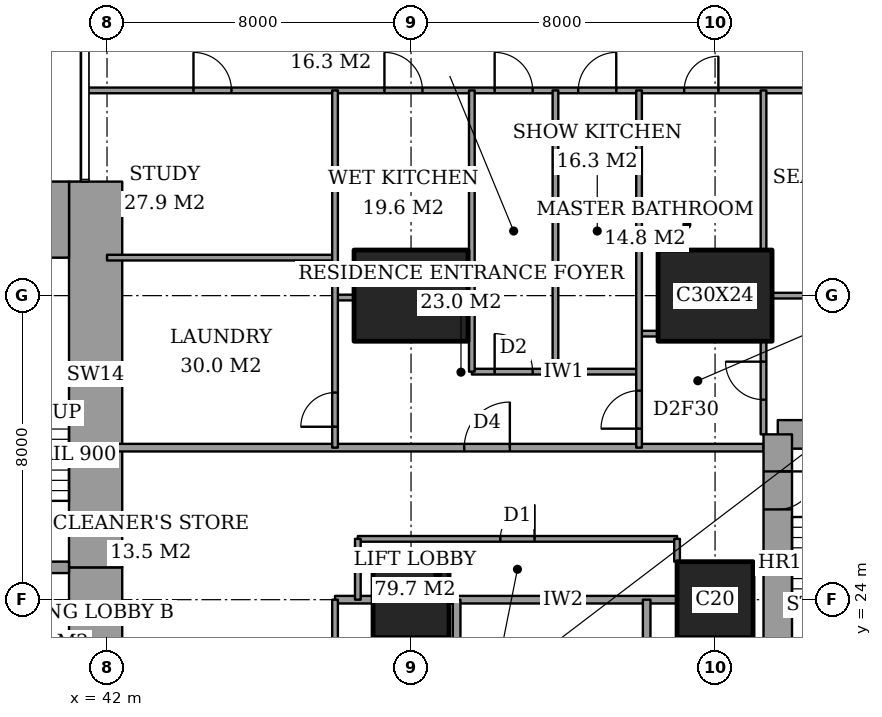
"""IFC4 building model, lengths in metres.
Left out: names, types, materials, properties, quantities, classifications, styles, units other than length and angle.
Written with IfcOpenShell. Run it as: python <this file> out.ifc"""

import sys

from ifc_helpers import new_model, si_unit, direction, frame, frame_2d, origin, origin_2d, place, context, subcontext, project, spatial, rectangle, extrude, element, fill, save


model = new_model("IFC4")
c1 = context("Model", 3, precision=1e-05, world=origin(), true_north=direction((0.0, 1.0)))
c2 = subcontext(c1, "Body", "Model", "MODEL_VIEW")
j1 = project(units=[si_unit("LENGTHUNIT", "METRE"), si_unit("PLANEANGLEUNIT", "RADIAN")], contexts=[c1])
p1 = place(None, origin())
s1 = spatial("IfcSite", under=j1, at=p1, CompositionType="ELEMENT")
p2 = place(p1, origin())
s2 = spatial("IfcBuilding", under=s1, at=p2, CompositionType="ELEMENT")
p3 = place(p2, frame((0.0, 0.0, 36.8)))
s3 = spatial("IfcBuildingStorey", under=s2, at=p3, CompositionType="ELEMENT", Elevation=36.8)
p4 = place(p3, frame((50.0, 24.0, 0.0), z_axis=(0.0, 0.0, 1.0), x_axis=(1.0, 0.0, 0.0)))
e1 = element("IfcColumn", 1, at=p4, inside=s3, PredefinedType="COLUMN", context=c2, shape_type="SweptSolid", body=[
    extrude(rectangle(XDim=2.0, YDim=2.0, at=origin_2d()), origin(), (0.0, 0.0, 1.0), 3.6),
])
p5 = place(p3, frame((50.0, 32.0, 0.0), z_axis=(0.0, 0.0, 1.0), x_axis=(1.0, 0.0, 0.0)))
e2 = element("IfcColumn", 2, at=p5, inside=s3, PredefinedType="COLUMN", context=c2, shape_type="SweptSolid", body=[
    extrude(rectangle(XDim=3.0, YDim=2.4, at=origin_2d()), origin(), (0.0, 0.0, 1.0), 3.6),
])
p6 = place(p3, frame((58.0, 24.0, 0.0), z_axis=(0.0, 0.0, 1.0), x_axis=(1.0, 0.0, 0.0)))
e3 = element("IfcColumn", 3, at=p6, inside=s3, PredefinedType="COLUMN", context=c2, shape_type="SweptSolid", body=[
    extrude(rectangle(XDim=2.0, YDim=2.0, at=origin_2d()), origin(), (0.0, 0.0, 1.0), 3.6),
])
p7 = place(p3, frame((58.0, 32.0, 0.0), z_axis=(0.0, 0.0, 1.0), x_axis=(1.0, 0.0, 0.0)))
e4 = element("IfcColumn", 4, at=p7, inside=s3, PredefinedType="COLUMN", context=c2, shape_type="SweptSolid", body=[
    extrude(rectangle(XDim=3.0, YDim=2.4, at=origin_2d()), origin(), (0.0, 0.0, 1.0), 3.6),
])
p8 = place(p3, frame((37.85, 34.0, 0.0), z_axis=(0.0, 0.0, 1.0), x_axis=(1.0, 0.0, 0.0)))
e5 = element("IfcWall", 5, at=p8, inside=s3, PredefinedType="SHEAR", context=c2, shape_type="SweptSolid", body=[
    extrude(rectangle(XDim=3.15, YDim=2.0, at=frame_2d((1.575, 0.0))), origin(), (0.0, 0.0, 1.0), 3.6),
])
p9 = place(p3, frame((41.7, 13.0, 0.0), z_axis=(0.0, 0.0, 1.0), x_axis=(0.0, 1.0, 0.0)))
e6 = element("IfcWall", 6, at=p9, inside=s3, PredefinedType="SHEAR", context=c2, shape_type="SweptSolid", body=[
    extrude(rectangle(XDim=11.85, YDim=1.4, at=frame_2d((5.925, 0.0))), origin(), (0.0, 0.0, 1.0), 3.6),
])
p10 = place(p9, frame((7.5, 0.0, 0.0)))
e7 = element("IfcOpeningElement", 7, at=p10, cuts=e6, PredefinedType="OPENING", context=c2, shape_type="SweptSolid", body=[
    extrude(rectangle(XDim=1.8, YDim=2.4, at=frame_2d((0.9, 1.2))), frame((0.0, 0.71, 0.0), z_axis=(0.0, -1.0, 0.0), x_axis=(1.0, 0.0, 0.0)), (0.0, 0.0, 1.0), 1.42),
])
p11 = place(p3, frame((41.7, 24.85, 0.0), z_axis=(0.0, 0.0, 1.0), x_axis=(0.0, 1.0, 0.0)))
e8 = element("IfcWall", 8, at=p11, inside=s3, PredefinedType="SHEAR", context=c2, shape_type="SweptSolid", body=[
    extrude(rectangle(XDim=10.15, YDim=1.4, at=frame_2d((5.075, 0.0))), origin(), (0.0, 0.0, 1.0), 3.6),
])
p12 = place(p3, frame((37.85, 24.85, 0.0), z_axis=(0.0, 0.0, 1.0), x_axis=(1.0, 0.0, 0.0)))
e9 = element("IfcWall", 9, at=p12, inside=s3, PredefinedType="SHEAR", context=c2, shape_type="SweptSolid", body=[
    extrude(rectangle(XDim=3.15, YDim=0.3, at=frame_2d((1.575, 0.0))), origin(), (0.0, 0.0, 1.0), 3.6),
])
p13 = place(p12, frame((0.95, 0.0, 0.0)))
e10 = element("IfcOpeningElement", 10, at=p13, cuts=e9, PredefinedType="OPENING", context=c2, shape_type="SweptSolid", body=[
    extrude(rectangle(XDim=1.0, YDim=2.1, at=frame_2d((0.5, 1.05))), frame((0.0, 0.16, 0.0), z_axis=(0.0, -1.0, 0.0), x_axis=(1.0, 0.0, 0.0)), (0.0, 0.0, 1.0), 0.32),
])
p14 = place(p3, frame((64.1, 28.35, 0.0), z_axis=(0.0, 0.0, 1.0), x_axis=(-1.0, 0.0, 0.0)))
e11 = element("IfcWall", 11, at=p14, inside=s3, PredefinedType="SHEAR", context=c2, shape_type="SweptSolid", body=[
    extrude(rectangle(XDim=4.45, YDim=0.75, at=frame_2d((2.225, 0.0))), origin(), (0.0, 0.0, 1.0), 3.6),
])
p15 = place(p3, frame((59.65, 28.35, 0.0), z_axis=(0.0, 0.0, 1.0), x_axis=(0.0, -1.0, 0.0)))
e12 = element("IfcWall", 12, at=p15, inside=s3, PredefinedType="SHEAR", context=c2, shape_type="SweptSolid", body=[
    extrude(rectangle(XDim=8.7, YDim=0.75, at=frame_2d((4.35, 0.0))), origin(), (0.0, 0.0, 1.0), 3.6),
])
p16 = place(p15, frame((0.975, 0.0, 0.0)))
e13 = element("IfcOpeningElement", 13, at=p16, cuts=e12, PredefinedType="OPENING", context=c2, shape_type="SweptSolid", body=[
    extrude(rectangle(XDim=1.0, YDim=2.1, at=frame_2d((0.5, 1.05))), frame((0.0, 0.385, 0.0), z_axis=(0.0, -1.0, 0.0), x_axis=(1.0, 0.0, 0.0)), (0.0, 0.0, 1.0), 0.77),
])
p17 = place(p3, frame((48.0, 24.0, 0.0), z_axis=(0.0, 0.0, 1.0), x_axis=(1.0, 0.0, 0.0)))
e14 = element("IfcWall", 14, at=p17, inside=s3, PredefinedType="PARTITIONING", context=c2, shape_type="SweptSolid", body=[
    extrude(rectangle(XDim=1.0, YDim=0.2, at=frame_2d((0.5, 0.0))), origin(), (0.0, 0.0, 1.0), 3.35),
])
p18 = place(p3, frame((51.0, 24.0, 0.0), z_axis=(0.0, 0.0, 1.0), x_axis=(1.0, 0.0, 0.0)))
e15 = element("IfcWall", 15, at=p18, inside=s3, PredefinedType="PARTITIONING", context=c2, shape_type="SweptSolid", body=[
    extrude(rectangle(XDim=6.0, YDim=0.2, at=frame_2d((3.0, 0.0))), origin(), (0.0, 0.0, 1.0), 3.35),
])
p19 = place(p3, frame((48.6, 25.6, 0.0), z_axis=(0.0, 0.0, 1.0), x_axis=(1.0, 0.0, 0.0)))
e16 = element("IfcWall", 16, at=p19, inside=s3, PredefinedType="PARTITIONING", context=c2, shape_type="SweptSolid", body=[
    extrude(rectangle(XDim=8.4, YDim=0.15, at=frame_2d((4.2, 0.0))), origin(), (0.0, 0.0, 1.0), 3.35),
])
p20 = place(p19, frame((3.75, 0.0, 0.0)))
e17 = element("IfcOpeningElement", 17, at=p20, cuts=e16, PredefinedType="OPENING", context=c2, shape_type="SweptSolid", body=[
    extrude(rectangle(XDim=0.9, YDim=2.1, at=frame_2d((0.45, 1.05))), frame((0.0, 0.085, 0.0), z_axis=(0.0, -1.0, 0.0), x_axis=(1.0, 0.0, 0.0)), (0.0, 0.0, 1.0), 0.17),
])
p21 = place(p3, frame((42.0, 28.0, 0.0), z_axis=(0.0, 0.0, 1.0), x_axis=(1.0, 0.0, 0.0)))
e18 = element("IfcWall", 18, at=p21, inside=s3, PredefinedType="PARTITIONING", context=c2, shape_type="SweptSolid", body=[
    extrude(rectangle(XDim=17.275, YDim=0.2, at=frame_2d((8.637, 0.0))), origin(), (0.0, 0.0, 1.0), 3.35),
])
p22 = place(p21, frame((9.4, 0.0, 0.0)))
e19 = element("IfcOpeningElement", 19, at=p22, cuts=e18, PredefinedType="OPENING", context=c2, shape_type="SweptSolid", body=[
    extrude(rectangle(XDim=1.2, YDim=2.4, at=frame_2d((0.6, 1.2))), frame((0.0, 0.11, 0.0), z_axis=(0.0, -1.0, 0.0), x_axis=(1.0, 0.0, 0.0)), (0.0, 0.0, 1.0), 0.22),
])
p23 = place(p3, frame((51.6, 30.0, 0.0), z_axis=(0.0, 0.0, 1.0), x_axis=(1.0, 0.0, 0.0)))
e20 = element("IfcWall", 20, at=p23, inside=s3, PredefinedType="PARTITIONING", context=c2, shape_type="SweptSolid", body=[
    extrude(rectangle(XDim=4.4, YDim=0.15, at=frame_2d((2.2, 0.0))), origin(), (0.0, 0.0, 1.0), 3.35),
])
p24 = place(p23, frame((0.6, 0.0, 0.0)))
e21 = element("IfcOpeningElement", 21, at=p24, cuts=e20, PredefinedType="OPENING", context=c2, shape_type="SweptSolid", body=[
    extrude(rectangle(XDim=1.0, YDim=2.1, at=frame_2d((0.5, 1.05))), frame((0.0, 0.085, 0.0), z_axis=(0.0, -1.0, 0.0), x_axis=(1.0, 0.0, 0.0)), (0.0, 0.0, 1.0), 0.17),
])
p25 = place(p3, frame((56.0, 31.0, 0.0), z_axis=(0.0, 0.0, 1.0), x_axis=(1.0, 0.0, 0.0)))
e22 = element("IfcWall", 22, at=p25, inside=s3, PredefinedType="PARTITIONING", context=c2, shape_type="SweptSolid", body=[
    extrude(rectangle(XDim=0.5, YDim=0.15, at=frame_2d((0.25, 0.0))), origin(), (0.0, 0.0, 1.0), 3.35),
])
p26 = place(p3, frame((48.0, 31.95, 0.0), z_axis=(0.0, 0.0, 1.0), x_axis=(1.0, 0.0, 0.0)))
e23 = element("IfcWall", 23, at=p26, inside=s3, PredefinedType="PARTITIONING", context=c2, shape_type="SweptSolid", body=[
    extrude(rectangle(XDim=0.5, YDim=0.15, at=frame_2d((0.25, 0.0))), origin(), (0.0, 0.0, 1.0), 2.634),
])
p27 = place(p3, frame((59.5, 32.0, 0.0), z_axis=(0.0, 0.0, 1.0), x_axis=(1.0, 0.0, 0.0)))
e24 = element("IfcWall", 24, at=p27, inside=s3, PredefinedType="PARTITIONING", context=c2, shape_type="SweptSolid", body=[
    extrude(rectangle(XDim=5.15, YDim=0.15, at=frame_2d((2.575, 0.0))), origin(), (0.0, 0.0, 1.0), 2.634),
])
p28 = place(p3, frame((42.0, 33.0, 0.0), z_axis=(0.0, 0.0, 1.0), x_axis=(1.0, 0.0, 0.0)))
e25 = element("IfcWall", 25, at=p28, inside=s3, PredefinedType="PARTITIONING", context=c2, shape_type="SweptSolid", body=[
    extrude(rectangle(XDim=6.0, YDim=0.15, at=frame_2d((3.0, 0.0))), origin(), (0.0, 0.0, 1.0), 3.35),
])
p29 = place(p3, frame((41.439, 37.4, 0.0), z_axis=(0.0, 0.0, 1.0), x_axis=(1.0, 0.0, 0.0)))
e26 = element("IfcWall", 26, at=p29, inside=s3, PredefinedType="PARTITIONING", context=c2, shape_type="SweptSolid", body=[
    extrude(rectangle(XDim=25.011, YDim=0.15, at=frame_2d((12.505, 0.0))), origin(), (0.0, 0.0, 1.0), 3.35),
])
p30 = place(p29, frame((10.761, 0.0, 0.0)))
e27 = element("IfcOpeningElement", 27, at=p30, cuts=e26, PredefinedType="OPENING", context=c2, shape_type="SweptSolid", body=[
    extrude(rectangle(XDim=1.0, YDim=2.1, at=frame_2d((0.5, 1.05))), frame((0.0, 0.085, 0.0), z_axis=(0.0, -1.0, 0.0), x_axis=(1.0, 0.0, 0.0)), (0.0, 0.0, 1.0), 0.17),
])
p31 = place(p29, frame((20.924, 0.0, 0.0)))
e28 = element("IfcOpeningElement", 28, at=p31, cuts=e26, PredefinedType="OPENING", context=c2, shape_type="SweptSolid", body=[
    extrude(rectangle(XDim=1.0, YDim=2.1, at=frame_2d((0.5, 1.05))), frame((0.0, 0.085, 0.0), z_axis=(0.0, -1.0, 0.0), x_axis=(1.0, 0.0, 0.0)), (0.0, 0.0, 1.0), 0.17),
])
p32 = place(p29, frame((15.749, 0.0, 0.0)))
e29 = element("IfcOpeningElement", 29, at=p32, cuts=e26, PredefinedType="OPENING", context=c2, shape_type="SweptSolid", body=[
    extrude(rectangle(XDim=0.9, YDim=2.1, at=frame_2d((0.45, 1.05))), frame((0.0, 0.085, 0.0), z_axis=(0.0, -1.0, 0.0), x_axis=(1.0, 0.0, 0.0)), (0.0, 0.0, 1.0), 0.17),
])
p33 = place(p29, frame((12.961, 0.0, 0.0)))
e30 = element("IfcOpeningElement", 30, at=p33, cuts=e26, PredefinedType="OPENING", context=c2, shape_type="SweptSolid", body=[
    extrude(rectangle(XDim=1.0, YDim=2.1, at=frame_2d((0.5, 1.05))), frame((0.0, 0.085, 0.0), z_axis=(0.0, -1.0, 0.0), x_axis=(1.0, 0.0, 0.0)), (0.0, 0.0, 1.0), 0.17),
])
p34 = place(p29, frame((7.861, 0.0, 0.0)))
e31 = element("IfcOpeningElement", 31, at=p34, cuts=e26, PredefinedType="OPENING", context=c2, shape_type="SweptSolid", body=[
    extrude(rectangle(XDim=1.0, YDim=2.1, at=frame_2d((0.5, 1.05))), frame((0.0, 0.085, 0.0), z_axis=(0.0, -1.0, 0.0), x_axis=(1.0, 0.0, 0.0)), (0.0, 0.0, 1.0), 0.17),
])
p35 = place(p29, frame((2.836, 0.0, 0.0)))
e32 = element("IfcOpeningElement", 32, at=p35, cuts=e26, PredefinedType="OPENING", context=c2, shape_type="SweptSolid", body=[
    extrude(rectangle(XDim=1.0, YDim=2.1, at=frame_2d((0.5, 1.05))), frame((0.0, 0.085, 0.0), z_axis=(0.0, -1.0, 0.0), x_axis=(1.0, 0.0, 0.0)), (0.0, 0.0, 1.0), 0.17),
])
p36 = place(p3, frame((48.0, 10.6, 0.0), z_axis=(0.0, 0.0, 1.0), x_axis=(0.0, 1.0, 0.0)))
e33 = element("IfcWall", 33, at=p36, inside=s3, PredefinedType="PARTITIONING", context=c2, shape_type="SweptSolid", body=[
    extrude(rectangle(XDim=13.4, YDim=0.15, at=frame_2d((6.7, 0.0))), origin(), (0.0, 0.0, 1.0), 3.35),
])
p37 = place(p36, frame((10.8, 0.0, 0.0)))
e34 = element("IfcOpeningElement", 34, at=p37, cuts=e33, PredefinedType="OPENING", context=c2, shape_type="SweptSolid", body=[
    extrude(rectangle(XDim=1.2, YDim=2.4, at=frame_2d((0.6, 1.2))), frame((0.0, 0.085, 0.0), z_axis=(0.0, -1.0, 0.0), x_axis=(1.0, 0.0, 0.0)), (0.0, 0.0, 1.0), 0.17),
])
p38 = place(p36, frame((6.7, 0.0, 0.0)))
e35 = element("IfcOpeningElement", 35, at=p38, cuts=e33, PredefinedType="OPENING", context=c2, shape_type="SweptSolid", body=[
    extrude(rectangle(XDim=0.9, YDim=2.1, at=frame_2d((0.45, 1.05))), frame((0.0, 0.085, 0.0), z_axis=(0.0, -1.0, 0.0), x_axis=(1.0, 0.0, 0.0)), (0.0, 0.0, 1.0), 0.17),
])
p39 = place(p3, frame((48.0, 28.0, 0.0), z_axis=(0.0, 0.0, 1.0), x_axis=(0.0, 1.0, 0.0)))
e36 = element("IfcWall", 36, at=p39, inside=s3, PredefinedType="PARTITIONING", context=c2, shape_type="SweptSolid", body=[
    extrude(rectangle(XDim=9.4, YDim=0.15, at=frame_2d((4.7, 0.0))), origin(), (0.0, 0.0, 1.0), 3.35),
])
p40 = place(p39, frame((0.55, 0.0, 0.0)))
e37 = element("IfcOpeningElement", 37, at=p40, cuts=e36, PredefinedType="OPENING", context=c2, shape_type="SweptSolid", body=[
    extrude(rectangle(XDim=0.9, YDim=2.1, at=frame_2d((0.45, 1.05))), frame((0.0, 0.085, 0.0), z_axis=(0.0, -1.0, 0.0), x_axis=(1.0, 0.0, 0.0)), (0.0, 0.0, 1.0), 0.17),
])
p41 = place(p3, frame((48.6, 24.0, 0.0), z_axis=(0.0, 0.0, 1.0), x_axis=(0.0, 1.0, 0.0)))
e38 = element("IfcWall", 38, at=p41, inside=s3, PredefinedType="PARTITIONING", context=c2, shape_type="SweptSolid", body=[
    extrude(rectangle(XDim=1.6, YDim=0.15, at=frame_2d((0.8, 0.0))), origin(), (0.0, 0.0, 1.0), 3.35),
])
p42 = place(p3, frame((51.2, 21.6, 0.0), z_axis=(0.0, 0.0, 1.0), x_axis=(0.0, 1.0, 0.0)))
e39 = element("IfcWall", 39, at=p42, inside=s3, PredefinedType="PARTITIONING", context=c2, shape_type="SweptSolid", body=[
    extrude(rectangle(XDim=2.4, YDim=0.2, at=frame_2d((1.2, 0.0))), origin(), (0.0, 0.0, 1.0), 3.35),
])
for number, where, z_axis, x_axis in (
    (40, (51.6, 30.0, 0.0), (0.0, 0.0, 1.0), (0.0, 1.0, 0.0)),
    (41, (53.8, 30.0, 0.0), (0.0, 0.0, 1.0), (0.0, 1.0, 0.0)),
):
    element("IfcWall", number, at=place(p3, frame(where, z_axis=z_axis, x_axis=x_axis)), inside=s3, PredefinedType="PARTITIONING", context=c2, shape_type="SweptSolid", body=[
        extrude(rectangle(XDim=7.4, YDim=0.15, at=frame_2d((3.7, 0.0))), origin(), (0.0, 0.0, 1.0), 3.35),
    ])
p43 = place(p3, frame((56.0, 28.0, 0.0), z_axis=(0.0, 0.0, 1.0), x_axis=(0.0, 1.0, 0.0)))
e42 = element("IfcWall", 42, at=p43, inside=s3, PredefinedType="PARTITIONING", context=c2, shape_type="SweptSolid", body=[
    extrude(rectangle(XDim=9.4, YDim=0.15, at=frame_2d((4.7, 0.0))), origin(), (0.0, 0.0, 1.0), 3.35),
])
p44 = place(p43, frame((0.5, 0.0, 0.0)))
e43 = element("IfcOpeningElement", 43, at=p44, cuts=e42, PredefinedType="OPENING", context=c2, shape_type="SweptSolid", body=[
    extrude(rectangle(XDim=1.0, YDim=2.1, at=frame_2d((0.5, 1.05))), frame((0.0, 0.085, 0.0), z_axis=(0.0, -1.0, 0.0), x_axis=(1.0, 0.0, 0.0)), (0.0, 0.0, 1.0), 0.17),
])
p45 = place(p3, frame((56.2, 21.6, 0.0), z_axis=(0.0, 0.0, 1.0), x_axis=(0.0, 1.0, 0.0)))
e44 = element("IfcWall", 44, at=p45, inside=s3, PredefinedType="PARTITIONING", context=c2, shape_type="SweptSolid", body=[
    extrude(rectangle(XDim=2.4, YDim=0.2, at=frame_2d((1.2, 0.0))), origin(), (0.0, 0.0, 1.0), 3.35),
])
p46 = place(p3, frame((57.0, 25.0, 0.0), z_axis=(0.0, 0.0, 1.0), x_axis=(0.0, 1.0, 0.0)))
e45 = element("IfcWall", 45, at=p46, inside=s3, PredefinedType="PARTITIONING", context=c2, shape_type="SweptSolid", body=[
    extrude(rectangle(XDim=0.6, YDim=0.15, at=frame_2d((0.3, 0.0))), origin(), (0.0, 0.0, 1.0), 3.35),
])
p47 = place(p3, frame((59.275, 28.35, 0.0), z_axis=(0.0, 0.0, 1.0), x_axis=(0.0, 1.0, 0.0)))
e46 = element("IfcWall", 46, at=p47, inside=s3, PredefinedType="PARTITIONING", context=c2, shape_type="SweptSolid", body=[
    extrude(rectangle(XDim=2.45, YDim=0.15, at=frame_2d((1.225, 0.0))), origin(), (0.0, 0.0, 1.0), 3.35),
])
p48 = place(p47, frame((0.913, 0.0, 0.0)))
e47 = element("IfcOpeningElement", 47, at=p48, cuts=e46, PredefinedType="OPENING", context=c2, shape_type="SweptSolid", body=[
    extrude(rectangle(XDim=1.0, YDim=2.1, at=frame_2d((0.5, 1.05))), frame((0.0, 0.085, 0.0), z_axis=(0.0, -1.0, 0.0), x_axis=(1.0, 0.0, 0.0)), (0.0, 0.0, 1.0), 0.17),
])
p49 = place(p3, frame((59.275, 33.2, 0.0), z_axis=(0.0, 0.0, 1.0), x_axis=(0.0, 1.0, 0.0)))
e48 = element("IfcWall", 48, at=p49, inside=s3, PredefinedType="PARTITIONING", context=c2, shape_type="SweptSolid", body=[
    extrude(rectangle(XDim=4.2, YDim=0.15, at=frame_2d((2.1, 0.0))), origin(), (0.0, 0.0, 1.0), 3.35),
])
p50 = place(p30, origin())
e49 = element("IfcDoor", 49, at=p50, inside=s3, OperationType="SINGLE_SWING_RIGHT", PredefinedType="DOOR", context=c2, shape_type="SweptSolid", body=[
    extrude(rectangle(XDim=1.0, YDim=2.1, at=frame_2d((0.5, 1.05))), frame((0.0, 0.025, 0.0), z_axis=(0.0, -1.0, 0.0), x_axis=(1.0, 0.0, 0.0)), (0.0, 0.0, 1.0), 0.05),
])
fill(e27, e49)
p51 = place(p48, origin())
e50 = element("IfcDoor", 50, at=p51, inside=s3, OperationType="SINGLE_SWING_LEFT", PredefinedType="DOOR", context=c2, shape_type="SweptSolid", body=[
    extrude(rectangle(XDim=1.0, YDim=2.1, at=frame_2d((0.5, 1.05))), frame((0.0, 0.025, 0.0), z_axis=(0.0, -1.0, 0.0), x_axis=(1.0, 0.0, 0.0)), (0.0, 0.0, 1.0), 0.05),
])
fill(e47, e50)
p52 = place(p32, origin())
e51 = element("IfcDoor", 51, at=p52, inside=s3, OperationType="SINGLE_SWING_LEFT", PredefinedType="DOOR", context=c2, shape_type="SweptSolid", body=[
    extrude(rectangle(XDim=0.9, YDim=2.1, at=frame_2d((0.45, 1.05))), frame((0.0, 0.025, 0.0), z_axis=(0.0, -1.0, 0.0), x_axis=(1.0, 0.0, 0.0)), (0.0, 0.0, 1.0), 0.05),
])
fill(e29, e51)
p53 = place(p44, origin())
e52 = element("IfcDoor", 52, at=p53, inside=s3, OperationType="SINGLE_SWING_RIGHT", PredefinedType="DOOR", context=c2, shape_type="SweptSolid", body=[
    extrude(rectangle(XDim=1.0, YDim=2.1, at=frame_2d((0.5, 1.05))), frame((0.0, 0.025, 0.0), z_axis=(0.0, -1.0, 0.0), x_axis=(1.0, 0.0, 0.0)), (0.0, 0.0, 1.0), 0.05),
])
fill(e43, e52)
p54 = place(p22, origin())
e53 = element("IfcDoor", 53, at=p54, inside=s3, OperationType="SINGLE_SWING_LEFT", PredefinedType="DOOR", context=c2, shape_type="SweptSolid", body=[
    extrude(rectangle(XDim=1.2, YDim=2.4, at=frame_2d((0.6, 1.2))), frame((0.0, 0.025, 0.0), z_axis=(0.0, -1.0, 0.0), x_axis=(1.0, 0.0, 0.0)), (0.0, 0.0, 1.0), 0.05),
])
fill(e19, e53)
p55 = place(p33, origin())
e54 = element("IfcDoor", 54, at=p55, inside=s3, OperationType="SINGLE_SWING_LEFT", PredefinedType="DOOR", context=c2, shape_type="SweptSolid", body=[
    extrude(rectangle(XDim=1.0, YDim=2.1, at=frame_2d((0.5, 1.05))), frame((0.0, 0.025, 0.0), z_axis=(0.0, -1.0, 0.0), x_axis=(1.0, 0.0, 0.0)), (0.0, 0.0, 1.0), 0.05),
])
fill(e30, e54)
p56 = place(p24, origin())
e55 = element("IfcDoor", 55, at=p56, inside=s3, OperationType="SINGLE_SWING_RIGHT", PredefinedType="DOOR", context=c2, shape_type="SweptSolid", body=[
    extrude(rectangle(XDim=1.0, YDim=2.1, at=frame_2d((0.5, 1.05))), frame((0.0, 0.025, 0.0), z_axis=(0.0, -1.0, 0.0), x_axis=(1.0, 0.0, 0.0)), (0.0, 0.0, 1.0), 0.05),
])
fill(e21, e55)
p57 = place(p34, origin())
e56 = element("IfcDoor", 56, at=p57, inside=s3, OperationType="SINGLE_SWING_RIGHT", PredefinedType="DOOR", context=c2, shape_type="SweptSolid", body=[
    extrude(rectangle(XDim=1.0, YDim=2.1, at=frame_2d((0.5, 1.05))), frame((0.0, 0.025, 0.0), z_axis=(0.0, -1.0, 0.0), x_axis=(1.0, 0.0, 0.0)), (0.0, 0.0, 1.0), 0.05),
])
fill(e31, e56)
p58 = place(p35, origin())
e57 = element("IfcDoor", 57, at=p58, inside=s3, OperationType="SINGLE_SWING_RIGHT", PredefinedType="DOOR", context=c2, shape_type="SweptSolid", body=[
    extrude(rectangle(XDim=1.0, YDim=2.1, at=frame_2d((0.5, 1.05))), frame((0.0, 0.025, 0.0), z_axis=(0.0, -1.0, 0.0), x_axis=(1.0, 0.0, 0.0)), (0.0, 0.0, 1.0), 0.05),
])
fill(e32, e57)
p59 = place(p40, origin())
e58 = element("IfcDoor", 58, at=p59, inside=s3, OperationType="SINGLE_SWING_RIGHT", PredefinedType="DOOR", context=c2, shape_type="SweptSolid", body=[
    extrude(rectangle(XDim=0.9, YDim=2.1, at=frame_2d((0.45, 1.05))), frame((0.0, 0.025, 0.0), z_axis=(0.0, -1.0, 0.0), x_axis=(1.0, 0.0, 0.0)), (0.0, 0.0, 1.0), 0.05),
])
fill(e37, e58)
p60 = place(p20, origin())
e59 = element("IfcDoor", 59, at=p60, inside=s3, OperationType="SINGLE_SWING_LEFT", PredefinedType="DOOR", context=c2, shape_type="SweptSolid", body=[
    extrude(rectangle(XDim=0.9, YDim=2.1, at=frame_2d((0.45, 1.05))), frame((0.0, 0.025, 0.0), z_axis=(0.0, -1.0, 0.0), x_axis=(1.0, 0.0, 0.0)), (0.0, 0.0, 1.0), 0.05),
])
fill(e17, e59)
p61 = place(p16, origin())
e60 = element("IfcDoor", 60, at=p61, inside=s3, OperationType="SINGLE_SWING_RIGHT", PredefinedType="DOOR", context=c2, shape_type="SweptSolid", body=[
    extrude(rectangle(XDim=1.0, YDim=2.1, at=frame_2d((0.5, 1.05))), frame((0.0, 0.025, 0.0), z_axis=(0.0, -1.0, 0.0), x_axis=(1.0, 0.0, 0.0)), (0.0, 0.0, 1.0), 0.05),
])
fill(e13, e60)
save(model, sys.argv[1])
